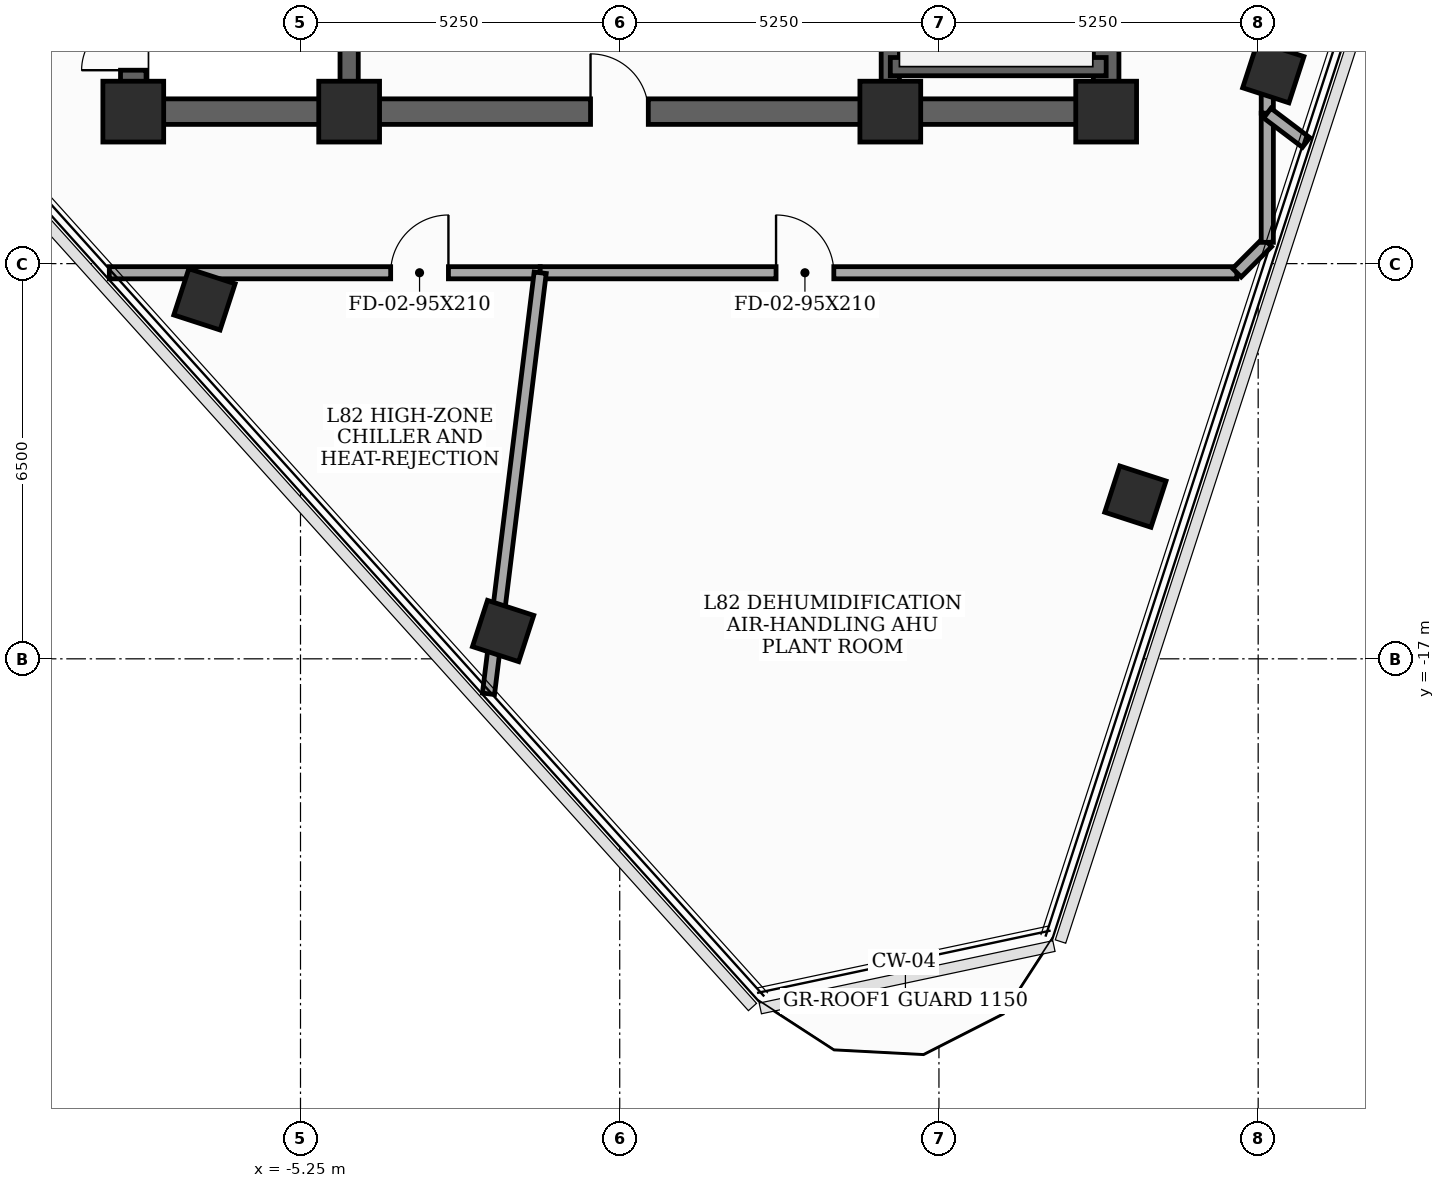
"""IFC4 building model, lengths in metres.
Left out: names, types, materials, properties, quantities, classifications, styles, units other than length and angle.
Written with IfcOpenShell. Run it as: python <this file> out.ifc"""

import sys

from ifc_helpers import new_model, si_unit, direction, frame, frame_2d, origin, origin_2d, place, context, subcontext, project, spatial, rectangle, extrude, element, fill, save


model = new_model("IFC4")
c1 = context("Model", 3, precision=1e-05, world=origin(), true_north=direction((0.0, 1.0)))
c2 = subcontext(c1, "Body", "Model", "MODEL_VIEW")
j1 = project(units=[si_unit("LENGTHUNIT", "METRE"), si_unit("PLANEANGLEUNIT", "RADIAN")], contexts=[c1])
p1 = place(None, origin())
s1 = spatial("IfcSite", under=j1, at=p1, CompositionType="ELEMENT")
p2 = place(p1, origin())
s2 = spatial("IfcBuilding", under=s1, at=p2, CompositionType="ELEMENT")
p3 = place(p2, frame((0.0, 0.0, 317.4)))
s3 = spatial("IfcBuildingStorey", under=s2, at=p3, CompositionType="ELEMENT", Elevation=317.4)
for number, where, z_axis, x_axis in (
    (1, (-8.0, -8.0, 0.0), (0.0, 0.0, 1.0), (1.0, 0.0, 0.0)),
    (2, (-4.45, -8.0, 0.0), (0.0, 0.0, 1.0), (1.0, 0.0, 0.0)),
    (3, (4.45, -8.0, 0.0), (0.0, 0.0, 1.0), (1.0, 0.0, 0.0)),
    (4, (8.0, -8.0, 0.0), (0.0, 0.0, 1.0), (1.0, 0.0, 0.0)),
):
    element("IfcColumn", number, at=place(p3, frame(where, z_axis=z_axis, x_axis=x_axis)), inside=s3, PredefinedType="COLUMN", context=c2, shape_type="SweptSolid", body=[
        extrude(rectangle(XDim=1.0, YDim=1.0, at=origin_2d()), origin(), (0.0, 0.0, 1.0), 4.6),
    ])
for number, where, z_axis, x_axis in (
    (5, (8.48, -14.332, 0.0), (0.0, 0.0, 1.0), (0.309, 0.951, 0.0)),
    (6, (10.749, -7.351, 0.0), (0.0, 0.0, 1.0), (0.309, 0.951, 0.0)),
    (7, (-6.829, -11.088, 0.0), (0.0, 0.0, 1.0), (0.309, 0.951, 0.0)),
    (8, (-1.918, -16.542, 0.0), (0.0, 0.0, 1.0), (0.309, 0.951, 0.0)),
):
    element("IfcColumn", number, at=place(p3, frame(where, z_axis=z_axis, x_axis=x_axis)), inside=s3, PredefinedType="COLUMN", context=c2, shape_type="SweptSolid", body=[
        extrude(rectangle(XDim=0.8, YDim=0.8, at=origin_2d()), origin(), (0.0, 0.0, 1.0), 4.6),
    ])
p4 = place(p3, frame((-8.0, -8.0, 0.0), z_axis=(0.0, 0.0, 1.0), x_axis=(0.0, 1.0, 0.0)))
e9 = element("IfcWall", 9, at=p4, inside=s3, PredefinedType="SHEAR", context=c2, shape_type="SweptSolid", body=[
    extrude(rectangle(XDim=16.0, YDim=0.42, at=frame_2d((8.0, 0.0))), origin(), (0.0, 0.0, 1.0), 4.38),
])
p5 = place(p4, frame((0.681, 0.0, 0.0)))
e10 = element("IfcOpeningElement", 10, at=p5, cuts=e9, PredefinedType="OPENING", context=c2, shape_type="SweptSolid", body=[
    extrude(rectangle(XDim=0.85, YDim=2.02, at=frame_2d((0.425, 1.01))), frame((0.0, 0.22, 0.0), z_axis=(0.0, -1.0, 0.0), x_axis=(1.0, 0.0, 0.0)), (0.0, 0.0, 1.0), 0.44),
])
p6 = place(p4, frame((5.35, 0.0, 0.0)))
e11 = element("IfcOpeningElement", 11, at=p6, cuts=e9, PredefinedType="OPENING", context=c2, shape_type="SweptSolid", body=[
    extrude(rectangle(XDim=1.05, YDim=2.15, at=frame_2d((0.525, 1.075))), frame((0.0, 0.22, 0.0), z_axis=(0.0, -1.0, 0.0), x_axis=(1.0, 0.0, 0.0)), (0.0, 0.0, 1.0), 0.44),
])
p7 = place(p3, frame((8.0, -8.0, 0.0), z_axis=(0.0, 0.0, 1.0), x_axis=(0.0, 1.0, 0.0)))
e12 = element("IfcWall", 12, at=p7, inside=s3, PredefinedType="SHEAR", context=c2, shape_type="SweptSolid", body=[
    extrude(rectangle(XDim=16.0, YDim=0.42, at=frame_2d((8.0, 0.0))), origin(), (0.0, 0.0, 1.0), 4.38),
])
p8 = place(p7, frame((9.6, 0.0, 0.0)))
e13 = element("IfcOpeningElement", 13, at=p8, cuts=e12, PredefinedType="OPENING", context=c2, shape_type="SweptSolid", body=[
    extrude(rectangle(XDim=1.05, YDim=2.15, at=frame_2d((0.525, 1.075))), frame((0.0, 0.22, 0.0), z_axis=(0.0, -1.0, 0.0), x_axis=(1.0, 0.0, 0.0)), (0.0, 0.0, 1.0), 0.44),
])
p9 = place(p7, frame((14.469, 0.0, 0.0)))
e14 = element("IfcOpeningElement", 14, at=p9, cuts=e12, PredefinedType="OPENING", context=c2, shape_type="SweptSolid", body=[
    extrude(rectangle(XDim=0.85, YDim=2.02, at=frame_2d((0.425, 1.01))), frame((0.0, 0.22, 0.0), z_axis=(0.0, -1.0, 0.0), x_axis=(1.0, 0.0, 0.0)), (0.0, 0.0, 1.0), 0.44),
])
p10 = place(p3, frame((-8.0, -8.0, 0.0), z_axis=(0.0, 0.0, 1.0), x_axis=(1.0, 0.0, 0.0)))
e15 = element("IfcWall", 15, at=p10, inside=s3, PredefinedType="SHEAR", context=c2, shape_type="SweptSolid", body=[
    extrude(rectangle(XDim=16.0, YDim=0.42, at=frame_2d((8.0, 0.0))), origin(), (0.0, 0.0, 1.0), 4.38),
])
p11 = place(p10, frame((7.52, 0.0, 0.0)))
e16 = element("IfcOpeningElement", 16, at=p11, cuts=e15, PredefinedType="OPENING", context=c2, shape_type="SweptSolid", body=[
    extrude(rectangle(XDim=0.95, YDim=2.1, at=frame_2d((0.475, 1.05))), frame((0.0, 0.22, 0.0), z_axis=(0.0, -1.0, 0.0), x_axis=(1.0, 0.0, 0.0)), (0.0, 0.0, 1.0), 0.44),
])
for number, where, z_axis, x_axis in (
    (17, (-4.45, -7.79, 0.0), (0.0, 0.0, 1.0), (0.0, 1.0, 0.0)),
    (18, (4.45, -7.79, 0.0), (0.0, 0.0, 1.0), (0.0, 1.0, 0.0)),
):
    element("IfcWall", number, at=place(p3, frame(where, z_axis=z_axis, x_axis=x_axis)), inside=s3, PredefinedType="SHEAR", context=c2, shape_type="SweptSolid", body=[
        extrude(rectangle(XDim=15.58, YDim=0.3, at=frame_2d((7.79, 0.0))), origin(), (0.0, 0.0, 1.0), 4.38),
    ])
p12 = place(p3, frame((4.45, -7.26, 0.0), z_axis=(0.0, 0.0, 1.0), x_axis=(1.0, 0.0, 0.0)))
e19 = element("IfcWall", 19, at=p12, inside=s3, PredefinedType="SHEAR", context=c2, shape_type="SweptSolid", body=[
    extrude(rectangle(XDim=3.55, YDim=0.3, at=frame_2d((1.775, 0.0))), origin(), (0.0, 0.0, 1.0), 4.38),
])
p13 = place(p3, frame((-8.394, -10.65, 0.0), z_axis=(0.0, 0.0, 1.0), x_axis=(1.0, 0.0, 0.0)))
e20 = element("IfcWall", 20, at=p13, inside=s3, PredefinedType="SOLIDWALL", context=c2, shape_type="SweptSolid", body=[
    extrude(rectangle(XDim=7.086, YDim=0.2, at=frame_2d((3.543, 0.0))), origin(), (0.0, 0.0, 1.0), 2.965),
])
p14 = place(p13, frame((4.627, 0.0, 0.0)))
e21 = element("IfcOpeningElement", 21, at=p14, cuts=e20, PredefinedType="OPENING", context=c2, shape_type="SweptSolid", body=[
    extrude(rectangle(XDim=0.95, YDim=2.1, at=frame_2d((0.475, 1.05))), frame((0.0, 0.11, 0.0), z_axis=(0.0, -1.0, 0.0), x_axis=(1.0, 0.0, 0.0)), (0.0, 0.0, 1.0), 0.22),
])
p15 = place(p3, frame((-1.308, -10.65, 0.0), z_axis=(0.0, 0.0, 1.0), x_axis=(1.0, 0.0, 0.0)))
e22 = element("IfcWall", 22, at=p15, inside=s3, PredefinedType="SOLIDWALL", context=c2, shape_type="SweptSolid", body=[
    extrude(rectangle(XDim=11.458, YDim=0.2, at=frame_2d((5.729, 0.0))), origin(), (0.0, 0.0, 1.0), 2.965),
])
p16 = place(p15, frame((3.879, 0.0, 0.0)))
e23 = element("IfcOpeningElement", 23, at=p16, cuts=e22, PredefinedType="OPENING", context=c2, shape_type="SweptSolid", body=[
    extrude(rectangle(XDim=0.95, YDim=2.1, at=frame_2d((0.475, 1.05))), frame((0.0, 0.11, 0.0), z_axis=(0.0, -1.0, 0.0), x_axis=(1.0, 0.0, 0.0)), (0.0, 0.0, 1.0), 0.22),
])
p17 = place(p3, frame((10.15, -10.65, 0.0), z_axis=(0.0, 0.0, 1.0), x_axis=(0.707106781187, 0.707106781187, 0.0)))
e24 = element("IfcWall", 24, at=p17, inside=s3, PredefinedType="SOLIDWALL", context=c2, shape_type="SweptSolid", body=[
    extrude(rectangle(XDim=0.707, YDim=0.2, at=frame_2d((0.354, 0.0))), origin(), (0.0, 0.0, 1.0), 4.38),
])
p18 = place(p3, frame((10.65, -10.15, 0.0), z_axis=(0.0, 0.0, 1.0), x_axis=(0.0, 1.0, 0.0)))
e25 = element("IfcWall", 25, at=p18, inside=s3, PredefinedType="SOLIDWALL", context=c2, shape_type="SweptSolid", body=[
    extrude(rectangle(XDim=2.125, YDim=0.2, at=frame_2d((1.062, 0.0))), origin(), (0.0, 0.0, 1.0), 2.965),
])
p19 = place(p3, frame((10.65, -8.025, 0.0), z_axis=(0.0, 0.0, 1.0), x_axis=(0.0, 1.0, 0.0)))
e26 = element("IfcWall", 26, at=p19, inside=s3, PredefinedType="SOLIDWALL", context=c2, shape_type="SweptSolid", body=[
    extrude(rectangle(XDim=12.546, YDim=0.2, at=frame_2d((6.273, 0.0))), origin(), (0.0, 0.0, 1.0), 2.965),
])
p20 = place(p19, frame((5.798, 0.0, 0.0)))
e27 = element("IfcOpeningElement", 27, at=p20, cuts=e26, PredefinedType="OPENING", context=c2, shape_type="SweptSolid", body=[
    extrude(rectangle(XDim=0.95, YDim=2.1, at=frame_2d((0.475, 1.05))), frame((0.0, 0.11, 0.0), z_axis=(0.0, -1.0, 0.0), x_axis=(1.0, 0.0, 0.0)), (0.0, 0.0, 1.0), 0.22),
])
p21 = place(p3, frame((-2.158, -17.575, 0.0), z_axis=(0.0, 0.0, 1.0), x_axis=(0.12186832175, 0.992546277084, 0.0)))
e28 = element("IfcWall", 28, at=p21, inside=s3, PredefinedType="SOLIDWALL", context=c2, shape_type="SweptSolid", body=[
    extrude(rectangle(XDim=6.978, YDim=0.2, at=frame_2d((3.489, 0.0))), origin(), (0.0, 0.0, 1.0), 2.965),
])
p22 = place(p3, frame((11.288, -8.507, 0.0), z_axis=(0.0, 0.0, 1.0), x_axis=(-0.798017398901, 0.602634409117, 0.0)))
e29 = element("IfcWall", 29, at=p22, inside=s3, PredefinedType="SOLIDWALL", context=c2, shape_type="SweptSolid", body=[
    extrude(rectangle(XDim=0.8, YDim=0.2, at=frame_2d((0.4, 0.0))), origin(), (0.0, 0.0, 1.0), 2.965),
])
p23 = place(p5, origin())
e30 = element("IfcDoor", 30, at=p23, inside=s3, OperationType="SINGLE_SWING_LEFT", PredefinedType="TRAPDOOR", context=c2, shape_type="SweptSolid", body=[
    extrude(rectangle(XDim=0.85, YDim=2.02, at=frame_2d((0.425, 1.01))), frame((0.0, 0.025, 0.0), z_axis=(0.0, -1.0, 0.0), x_axis=(1.0, 0.0, 0.0)), (0.0, 0.0, 1.0), 0.05),
])
fill(e10, e30)
p24 = place(p11, origin())
e31 = element("IfcDoor", 31, at=p24, inside=s3, OperationType="SINGLE_SWING_LEFT", PredefinedType="DOOR", context=c2, shape_type="SweptSolid", body=[
    extrude(rectangle(XDim=0.95, YDim=2.1, at=frame_2d((0.475, 1.05))), frame((0.0, 0.025, 0.0), z_axis=(0.0, -1.0, 0.0), x_axis=(1.0, 0.0, 0.0)), (0.0, 0.0, 1.0), 0.05),
])
fill(e16, e31)
p25 = place(p14, origin())
e32 = element("IfcDoor", 32, at=p25, inside=s3, OperationType="SINGLE_SWING_RIGHT", PredefinedType="DOOR", context=c2, shape_type="SweptSolid", body=[
    extrude(rectangle(XDim=0.95, YDim=2.1, at=frame_2d((0.475, 1.05))), frame((0.0, 0.025, 0.0), z_axis=(0.0, -1.0, 0.0), x_axis=(1.0, 0.0, 0.0)), (0.0, 0.0, 1.0), 0.05),
])
fill(e21, e32)
p26 = place(p16, origin())
e33 = element("IfcDoor", 33, at=p26, inside=s3, OperationType="SINGLE_SWING_LEFT", PredefinedType="DOOR", context=c2, shape_type="SweptSolid", body=[
    extrude(rectangle(XDim=0.95, YDim=2.1, at=frame_2d((0.475, 1.05))), frame((0.0, 0.025, 0.0), z_axis=(0.0, -1.0, 0.0), x_axis=(1.0, 0.0, 0.0)), (0.0, 0.0, 1.0), 0.05),
])
fill(e23, e33)
save(model, sys.argv[1])
